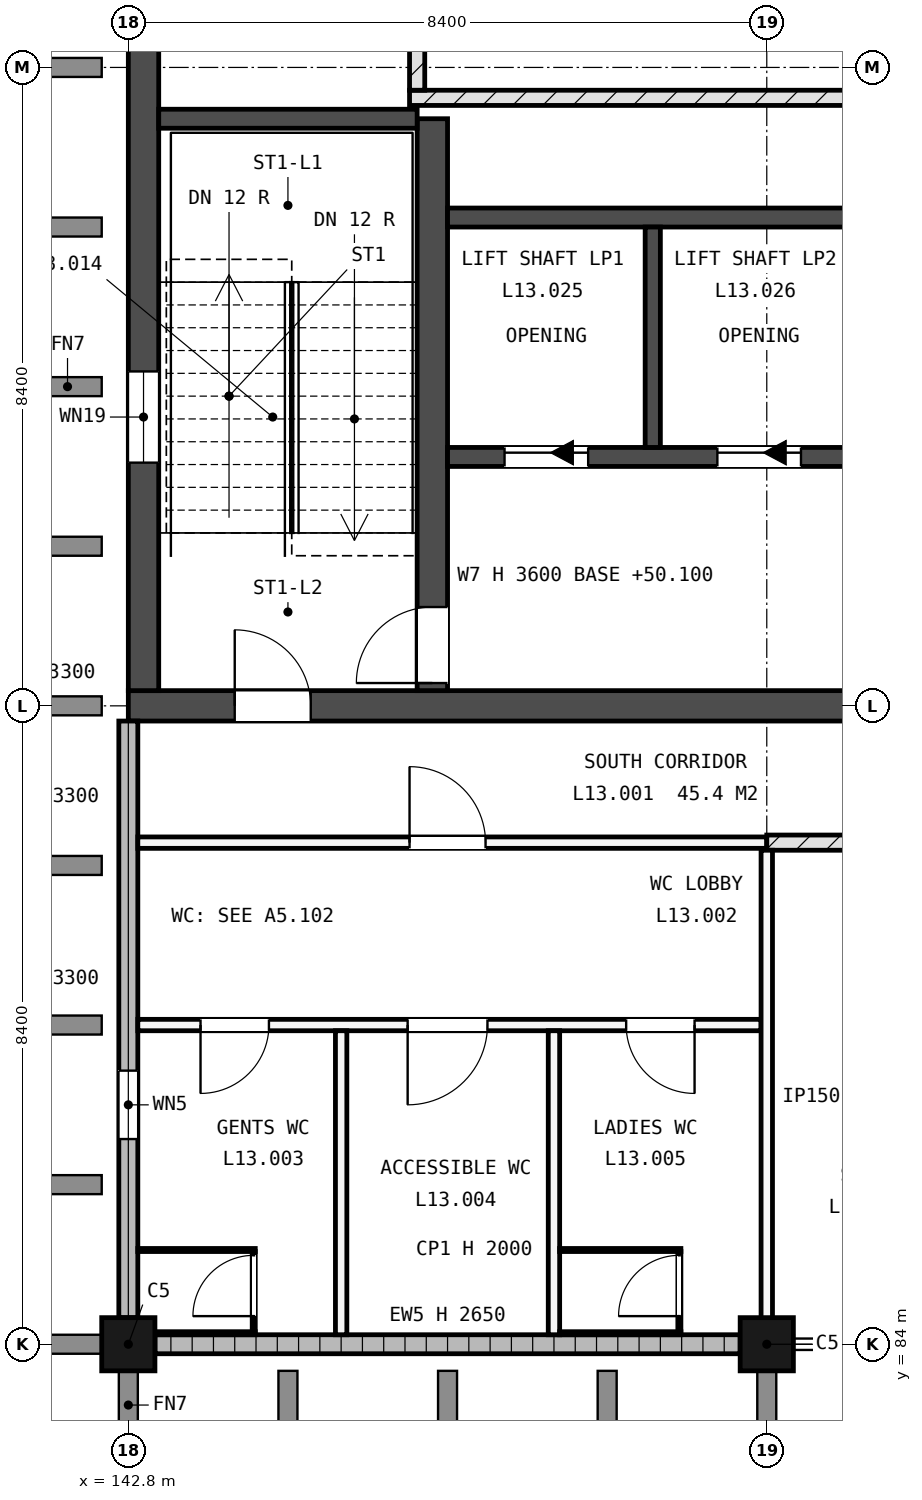
"""IFC4 building model, lengths in metres.
Left out: names, types, materials, properties, quantities, classifications, styles, units other than length and angle.
Written with IfcOpenShell. Run it as: python <this file> out.ifc"""

import sys

from ifc_helpers import new_model, si_unit, direction, frame, frame_2d, origin, origin_2d, place, context, subcontext, project, spatial, rectangle, extrude, element, fill, save


model = new_model("IFC4")
c1 = context("Model", 3, precision=1e-05, world=origin(), true_north=direction((0.0, 1.0)))
c2 = subcontext(c1, "Body", "Model", "MODEL_VIEW")
j1 = project(units=[si_unit("LENGTHUNIT", "METRE"), si_unit("PLANEANGLEUNIT", "RADIAN")], contexts=[c1])
p1 = place(None, origin())
s1 = spatial("IfcSite", under=j1, at=p1, CompositionType="ELEMENT")
p2 = place(p1, origin())
s2 = spatial("IfcBuilding", under=s1, at=p2, CompositionType="ELEMENT")
p3 = place(p2, frame((0.0, 0.0, 50.4)))
s3 = spatial("IfcBuildingStorey", under=s2, at=p3, CompositionType="ELEMENT", Elevation=50.4)
for number, where, z_axis, x_axis in (
    (1, (142.8, 84.0, -0.3), (0.0, 0.0, 1.0), (1.0, 0.0, 0.0)),
    (2, (151.2, 84.0, -0.3), (0.0, 0.0, 1.0), (1.0, 0.0, 0.0)),
):
    element("IfcColumn", number, at=place(p3, frame(where, z_axis=z_axis, x_axis=x_axis)), inside=s3, PredefinedType="COLUMN", context=c2, shape_type="SweptSolid", body=[
        extrude(rectangle(XDim=0.7, YDim=0.7, at=origin_2d()), origin(), (0.0, 0.0, 1.0), 3.6),
    ])
p4 = place(p3, frame((142.8, 92.4, -0.3), z_axis=(0.0, 0.0, 1.0), x_axis=(1.0, 0.0, 0.0)))
e3 = element("IfcWall", 3, at=p4, inside=s3, PredefinedType="SHEAR", context=c2, shape_type="SweptSolid", body=[
    extrude(rectangle(XDim=25.2, YDim=0.4, at=frame_2d((12.6, 0.0))), origin(), (0.0, 0.0, 1.0), 3.6),
])
p5 = place(p4, frame((1.4, 0.0, 0.3)))
e4 = element("IfcOpeningElement", 4, at=p5, cuts=e3, PredefinedType="OPENING", context=c2, shape_type="SweptSolid", body=[
    extrude(rectangle(XDim=1.0, YDim=2.1, at=frame_2d((0.5, 1.05))), frame((0.0, 0.21, 0.0), z_axis=(0.0, -1.0, 0.0), x_axis=(1.0, 0.0, 0.0)), (0.0, 0.0, 1.0), 0.42),
])
p6 = place(p4, frame((19.1, 0.0, 0.3)))
e5 = element("IfcOpeningElement", 5, at=p6, cuts=e3, PredefinedType="OPENING", context=c2, shape_type="SweptSolid", body=[
    extrude(rectangle(XDim=1.0, YDim=2.1, at=frame_2d((0.5, 1.05))), frame((0.0, 0.21, 0.0), z_axis=(0.0, -1.0, 0.0), x_axis=(1.0, 0.0, 0.0)), (0.0, 0.0, 1.0), 0.42),
])
p7 = place(p4, frame((10.4, 0.0, 0.3)))
e6 = element("IfcOpeningElement", 6, at=p7, cuts=e3, PredefinedType="OPENING", context=c2, shape_type="SweptSolid", body=[
    extrude(rectangle(XDim=1.0, YDim=2.1, at=frame_2d((0.5, 1.05))), frame((0.0, 0.21, 0.0), z_axis=(0.0, -1.0, 0.0), x_axis=(1.0, 0.0, 0.0)), (0.0, 0.0, 1.0), 0.42),
])
p8 = place(p3, frame((143.0, 92.6, -0.3), z_axis=(0.0, 0.0, 1.0), x_axis=(0.0, 1.0, 0.0)))
e7 = element("IfcWall", 7, at=p8, inside=s3, PredefinedType="SHEAR", context=c2, shape_type="SweptSolid", body=[
    extrude(rectangle(XDim=16.4, YDim=0.4, at=frame_2d((8.2, 0.0))), origin(), (0.0, 0.0, 1.0), 3.6),
])
p9 = place(p8, frame((3.0, 0.0, 1.9)))
e8 = element("IfcOpeningElement", 8, at=p9, cuts=e7, PredefinedType="OPENING", context=c2, shape_type="SweptSolid", body=[
    extrude(rectangle(XDim=1.2, YDim=0.9, at=frame_2d((0.6, 0.45))), frame((0.0, 0.21, 0.0), z_axis=(0.0, -1.0, 0.0), x_axis=(1.0, 0.0, 0.0)), (0.0, 0.0, 1.0), 0.42),
])
p10 = place(p3, frame((146.8, 92.6, -0.3), z_axis=(0.0, 0.0, 1.0), x_axis=(0.0, 1.0, 0.0)))
e9 = element("IfcWall", 9, at=p10, inside=s3, PredefinedType="SHEAR", context=c2, shape_type="SweptSolid", body=[
    extrude(rectangle(XDim=7.525, YDim=0.4, at=frame_2d((3.762, 0.0))), origin(), (0.0, 0.0, 1.0), 3.6),
])
p11 = place(p10, frame((0.1, 0.0, 0.3)))
e10 = element("IfcOpeningElement", 10, at=p11, cuts=e9, PredefinedType="OPENING", context=c2, shape_type="SweptSolid", body=[
    extrude(rectangle(XDim=1.0, YDim=2.1, at=frame_2d((0.5, 1.05))), frame((0.0, 0.21, 0.0), z_axis=(0.0, -1.0, 0.0), x_axis=(1.0, 0.0, 0.0)), (0.0, 0.0, 1.0), 0.42),
])
p12 = place(p3, frame((143.2, 100.125, -0.3), z_axis=(0.0, 0.0, 1.0), x_axis=(1.0, 0.0, 0.0)))
e11 = element("IfcWall", 11, at=p12, inside=s3, PredefinedType="SHEAR", context=c2, shape_type="SweptSolid", body=[
    extrude(rectangle(XDim=3.4, YDim=0.25, at=frame_2d((1.7, 0.0))), origin(), (0.0, 0.0, 1.0), 3.6),
])
p13 = place(p3, frame((147.0, 95.675, -0.3), z_axis=(0.0, 0.0, 1.0), x_axis=(1.0, 0.0, 0.0)))
e12 = element("IfcWall", 12, at=p13, inside=s3, PredefinedType="SHEAR", context=c2, shape_type="SweptSolid", body=[
    extrude(rectangle(XDim=11.25, YDim=0.25, at=frame_2d((5.625, 0.0))), origin(), (0.0, 0.0, 1.0), 3.6),
])
p14 = place(p13, frame((0.75, 0.0, 0.3)))
e13 = element("IfcOpeningElement", 13, at=p14, cuts=e12, PredefinedType="OPENING", context=c2, shape_type="SweptSolid", body=[
    extrude(rectangle(XDim=1.1, YDim=2.1, at=frame_2d((0.55, 1.05))), frame((0.0, 0.135, 0.0), z_axis=(0.0, -1.0, 0.0), x_axis=(1.0, 0.0, 0.0)), (0.0, 0.0, 1.0), 0.27),
])
p15 = place(p13, frame((3.55, 0.0, 0.3)))
e14 = element("IfcOpeningElement", 14, at=p15, cuts=e12, PredefinedType="OPENING", context=c2, shape_type="SweptSolid", body=[
    extrude(rectangle(XDim=1.1, YDim=2.1, at=frame_2d((0.55, 1.05))), frame((0.0, 0.135, 0.0), z_axis=(0.0, -1.0, 0.0), x_axis=(1.0, 0.0, 0.0)), (0.0, 0.0, 1.0), 0.27),
])
p16 = place(p13, frame((6.35, 0.0, 0.3)))
e15 = element("IfcOpeningElement", 15, at=p16, cuts=e12, PredefinedType="OPENING", context=c2, shape_type="SweptSolid", body=[
    extrude(rectangle(XDim=1.1, YDim=2.1, at=frame_2d((0.55, 1.05))), frame((0.0, 0.135, 0.0), z_axis=(0.0, -1.0, 0.0), x_axis=(1.0, 0.0, 0.0)), (0.0, 0.0, 1.0), 0.27),
])
p17 = place(p13, frame((9.15, 0.0, 0.3)))
e16 = element("IfcOpeningElement", 16, at=p17, cuts=e12, PredefinedType="OPENING", context=c2, shape_type="SweptSolid", body=[
    extrude(rectangle(XDim=1.1, YDim=2.1, at=frame_2d((0.55, 1.05))), frame((0.0, 0.135, 0.0), z_axis=(0.0, -1.0, 0.0), x_axis=(1.0, 0.0, 0.0)), (0.0, 0.0, 1.0), 0.27),
])
p18 = place(p3, frame((147.0, 98.825, -0.3), z_axis=(0.0, 0.0, 1.0), x_axis=(1.0, 0.0, 0.0)))
e17 = element("IfcWall", 17, at=p18, inside=s3, PredefinedType="SHEAR", context=c2, shape_type="SweptSolid", body=[
    extrude(rectangle(XDim=11.25, YDim=0.25, at=frame_2d((5.625, 0.0))), origin(), (0.0, 0.0, 1.0), 3.6),
])
p19 = place(p3, frame((149.7, 95.8, -0.3), z_axis=(0.0, 0.0, 1.0), x_axis=(0.0, 1.0, 0.0)))
e18 = element("IfcWall", 18, at=p19, inside=s3, PredefinedType="SHEAR", context=c2, shape_type="SweptSolid", body=[
    extrude(rectangle(XDim=2.9, YDim=0.2, at=frame_2d((1.45, 0.0))), origin(), (0.0, 0.0, 1.0), 3.6),
])
p20 = place(p3, frame((143.15, 84.0, 0.0), z_axis=(0.0, 0.0, 1.0), x_axis=(1.0, 0.0, 0.0)))
e19 = element("IfcWall", 19, at=p20, inside=s3, PredefinedType="STANDARD", context=c2, shape_type="SweptSolid", body=[
    extrude(rectangle(XDim=7.7, YDim=0.25, at=frame_2d((3.85, 0.0))), origin(), (0.0, 0.0, 1.0), 2.65),
])
p21 = place(p3, frame((142.8, 84.35, 0.0), z_axis=(0.0, 0.0, 1.0), x_axis=(0.0, 1.0, 0.0)))
e20 = element("IfcWall", 20, at=p21, inside=s3, PredefinedType="STANDARD", context=c2, shape_type="SweptSolid", body=[
    extrude(rectangle(XDim=7.85, YDim=0.25, at=frame_2d((3.925, 0.0))), origin(), (0.0, 0.0, 1.0), 3.3),
])
p22 = place(p21, frame((2.35, 0.0, 2.1)))
e21 = element("IfcOpeningElement", 21, at=p22, cuts=e20, PredefinedType="OPENING", context=c2, shape_type="SweptSolid", body=[
    extrude(rectangle(XDim=0.9, YDim=0.6, at=frame_2d((0.45, 0.3))), frame((0.0, 0.135, 0.0), z_axis=(0.0, -1.0, 0.0), x_axis=(1.0, 0.0, 0.0)), (0.0, 0.0, 1.0), 0.27),
])
p23 = place(p3, frame((142.925, 88.2, 0.0), z_axis=(0.0, 0.0, 1.0), x_axis=(1.0, 0.0, 0.0)))
e22 = element("IfcWall", 22, at=p23, inside=s3, PredefinedType="PARTITIONING", context=c2, shape_type="SweptSolid", body=[
    extrude(rectangle(XDim=8.2, YDim=0.15, at=frame_2d((4.1, 0.0))), origin(), (0.0, 0.0, 1.0), 3.3),
])
p24 = place(p23, frame((0.825, 0.0, 0.0)))
e23 = element("IfcOpeningElement", 23, at=p24, cuts=e22, PredefinedType="OPENING", context=c2, shape_type="SweptSolid", body=[
    extrude(rectangle(XDim=0.9, YDim=2.1, at=frame_2d((0.45, 1.05))), frame((0.0, 0.085, 0.0), z_axis=(0.0, -1.0, 0.0), x_axis=(1.0, 0.0, 0.0)), (0.0, 0.0, 1.0), 0.17),
])
p25 = place(p23, frame((3.55, 0.0, 0.0)))
e24 = element("IfcOpeningElement", 24, at=p25, cuts=e22, PredefinedType="OPENING", context=c2, shape_type="SweptSolid", body=[
    extrude(rectangle(XDim=1.05, YDim=2.25, at=frame_2d((0.525, 1.125))), frame((0.0, 0.085, 0.0), z_axis=(0.0, -1.0, 0.0), x_axis=(1.0, 0.0, 0.0)), (0.0, 0.0, 1.0), 0.17),
])
p26 = place(p23, frame((6.425, 0.0, 0.0)))
e25 = element("IfcOpeningElement", 25, at=p26, cuts=e22, PredefinedType="OPENING", context=c2, shape_type="SweptSolid", body=[
    extrude(rectangle(XDim=0.9, YDim=2.1, at=frame_2d((0.45, 1.05))), frame((0.0, 0.085, 0.0), z_axis=(0.0, -1.0, 0.0), x_axis=(1.0, 0.0, 0.0)), (0.0, 0.0, 1.0), 0.17),
])
p27 = place(p3, frame((142.925, 90.6, 0.0), z_axis=(0.0, 0.0, 1.0), x_axis=(1.0, 0.0, 0.0)))
e26 = element("IfcWall", 26, at=p27, inside=s3, PredefinedType="PARTITIONING", context=c2, shape_type="SweptSolid", body=[
    extrude(rectangle(XDim=8.275, YDim=0.15, at=frame_2d((4.137, 0.0))), origin(), (0.0, 0.0, 1.0), 3.3),
])
p28 = place(p27, frame((3.575, 0.0, 0.0)))
e27 = element("IfcOpeningElement", 27, at=p28, cuts=e26, PredefinedType="OPENING", context=c2, shape_type="SweptSolid", body=[
    extrude(rectangle(XDim=1.0, YDim=2.1, at=frame_2d((0.5, 1.05))), frame((0.0, 0.085, 0.0), z_axis=(0.0, -1.0, 0.0), x_axis=(1.0, 0.0, 0.0)), (0.0, 0.0, 1.0), 0.17),
])
p29 = place(p3, frame((151.2, 90.6, 0.0), z_axis=(0.0, 0.0, 1.0), x_axis=(1.0, 0.0, 0.0)))
e28 = element("IfcWall", 28, at=p29, inside=s3, PredefinedType="SOLIDWALL", context=c2, shape_type="SweptSolid", body=[
    extrude(rectangle(XDim=16.8, YDim=0.2, at=frame_2d((8.4, 0.0))), origin(), (0.0, 0.0, 1.0), 3.3),
])
p30 = place(p29, frame((1.575, 0.0, 0.0)))
e29 = element("IfcOpeningElement", 29, at=p30, cuts=e28, PredefinedType="OPENING", context=c2, shape_type="SweptSolid", body=[
    extrude(rectangle(XDim=1.05, YDim=2.1, at=frame_2d((0.525, 1.05))), frame((0.0, 0.11, 0.0), z_axis=(0.0, -1.0, 0.0), x_axis=(1.0, 0.0, 0.0)), (0.0, 0.0, 1.0), 0.22),
])
p31 = place(p29, frame((5.775, 0.0, 0.0)))
e30 = element("IfcOpeningElement", 30, at=p31, cuts=e28, PredefinedType="OPENING", context=c2, shape_type="SweptSolid", body=[
    extrude(rectangle(XDim=1.05, YDim=2.1, at=frame_2d((0.525, 1.05))), frame((0.0, 0.11, 0.0), z_axis=(0.0, -1.0, 0.0), x_axis=(1.0, 0.0, 0.0)), (0.0, 0.0, 1.0), 0.22),
])
p32 = place(p29, frame((10.0, 0.0, 0.0)))
e31 = element("IfcOpeningElement", 31, at=p32, cuts=e28, PredefinedType="OPENING", context=c2, shape_type="SweptSolid", body=[
    extrude(rectangle(XDim=1.0, YDim=2.1, at=frame_2d((0.5, 1.05))), frame((0.0, 0.11, 0.0), z_axis=(0.0, -1.0, 0.0), x_axis=(1.0, 0.0, 0.0)), (0.0, 0.0, 1.0), 0.22),
])
p33 = place(p29, frame((14.2, 0.0, 0.0)))
e32 = element("IfcOpeningElement", 32, at=p33, cuts=e28, PredefinedType="OPENING", context=c2, shape_type="SweptSolid", body=[
    extrude(rectangle(XDim=1.0, YDim=2.1, at=frame_2d((0.5, 1.05))), frame((0.0, 0.11, 0.0), z_axis=(0.0, -1.0, 0.0), x_axis=(1.0, 0.0, 0.0)), (0.0, 0.0, 1.0), 0.22),
])
p34 = place(p3, frame((146.5, 100.4, 0.0), z_axis=(0.0, 0.0, 1.0), x_axis=(1.0, 0.0, 0.0)))
e33 = element("IfcWall", 33, at=p34, inside=s3, PredefinedType="SOLIDWALL", context=c2, shape_type="SweptSolid", body=[
    extrude(rectangle(XDim=14.0, YDim=0.2, at=frame_2d((7.0, 0.0))), origin(), (0.0, 0.0, 1.0), 3.3),
])
p35 = place(p3, frame((145.6, 84.125, 0.0), z_axis=(0.0, 0.0, 1.0), x_axis=(0.0, 1.0, 0.0)))
e34 = element("IfcWall", 34, at=p35, inside=s3, PredefinedType="PARTITIONING", context=c2, shape_type="SweptSolid", body=[
    extrude(rectangle(XDim=4.0, YDim=0.15, at=frame_2d((2.0, 0.0))), origin(), (0.0, 0.0, 1.0), 3.3),
])
p36 = place(p3, frame((146.6, 100.5, 0.0), z_axis=(0.0, 0.0, 1.0), x_axis=(0.0, 1.0, 0.0)))
e35 = element("IfcWall", 35, at=p36, inside=s3, PredefinedType="SOLIDWALL", context=c2, shape_type="SweptSolid", body=[
    extrude(rectangle(XDim=5.3, YDim=0.2, at=frame_2d((2.65, 0.0))), origin(), (0.0, 0.0, 1.0), 3.3),
])
p37 = place(p36, frame((1.8, 0.0, 0.0)))
e36 = element("IfcOpeningElement", 36, at=p37, cuts=e35, PredefinedType="OPENING", context=c2, shape_type="SweptSolid", body=[
    extrude(rectangle(XDim=1.0, YDim=2.1, at=frame_2d((0.5, 1.05))), frame((0.0, 0.11, 0.0), z_axis=(0.0, -1.0, 0.0), x_axis=(1.0, 0.0, 0.0)), (0.0, 0.0, 1.0), 0.22),
])
p38 = place(p3, frame((148.4, 84.125, 0.0), z_axis=(0.0, 0.0, 1.0), x_axis=(0.0, 1.0, 0.0)))
e37 = element("IfcWall", 37, at=p38, inside=s3, PredefinedType="PARTITIONING", context=c2, shape_type="SweptSolid", body=[
    extrude(rectangle(XDim=4.0, YDim=0.15, at=frame_2d((2.0, 0.0))), origin(), (0.0, 0.0, 1.0), 3.3),
])
p39 = place(p3, frame((151.2, 84.0, 0.0), z_axis=(0.0, 0.0, 1.0), x_axis=(0.0, 1.0, 0.0)))
e38 = element("IfcWall", 38, at=p39, inside=s3, PredefinedType="PARTITIONING", context=c2, shape_type="SweptSolid", body=[
    extrude(rectangle(XDim=6.5, YDim=0.15, at=frame_2d((3.25, 0.0))), origin(), (0.0, 0.0, 1.0), 2.6),
])
p40 = place(p3, frame((142.93, 84.145, 0.0), z_axis=(0.0, 0.0, 1.0), x_axis=(1.0, 0.0, 0.0)))
e39 = element("IfcWall", 39, at=p40, inside=s3, PredefinedType="PARTITIONING", context=c2, shape_type="SweptSolid", body=[
    extrude(rectangle(XDim=1.54, YDim=0.04, at=frame_2d((0.77, 0.0))), origin(), (0.0, 0.0, 1.0), 2.0),
])
p41 = place(p3, frame((142.925, 85.24, 0.0), z_axis=(0.0, 0.0, 1.0), x_axis=(1.0, 0.0, 0.0)))
e40 = element("IfcWall", 40, at=p41, inside=s3, PredefinedType="PARTITIONING", context=c2, shape_type="SweptSolid", body=[
    extrude(rectangle(XDim=1.545, YDim=0.04, at=frame_2d((0.772, 0.0))), origin(), (0.0, 0.0, 1.0), 2.0),
])
p42 = place(p3, frame((144.45, 84.165, 0.0), z_axis=(0.0, 0.0, 1.0), x_axis=(0.0, 1.0, 0.0)))
e41 = element("IfcWall", 41, at=p42, inside=s3, PredefinedType="PARTITIONING", context=c2, shape_type="SweptSolid", body=[
    extrude(rectangle(XDim=1.055, YDim=0.04, at=frame_2d((0.527, 0.0))), origin(), (0.0, 0.0, 1.0), 2.0),
])
p43 = place(p42, frame((0.205, 0.0, 0.0)))
e42 = element("IfcOpeningElement", 42, at=p43, cuts=e41, PredefinedType="OPENING", context=c2, shape_type="SweptSolid", body=[
    extrude(rectangle(XDim=0.8, YDim=2.0, at=frame_2d((0.4, 1.0))), frame((0.0, 0.03, 0.0), z_axis=(0.0, -1.0, 0.0), x_axis=(1.0, 0.0, 0.0)), (0.0, 0.0, 1.0), 0.06),
])
for number, where, z_axis, x_axis in (
    (43, (148.475, 84.145, 0.0), (0.0, 0.0, 1.0), (1.0, 0.0, 0.0)),
    (44, (148.475, 85.24, 0.0), (0.0, 0.0, 1.0), (1.0, 0.0, 0.0)),
):
    element("IfcWall", number, at=place(p3, frame(where, z_axis=z_axis, x_axis=x_axis)), inside=s3, PredefinedType="PARTITIONING", context=c2, shape_type="SweptSolid", body=[
        extrude(rectangle(XDim=1.595, YDim=0.04, at=frame_2d((0.797, 0.0))), origin(), (0.0, 0.0, 1.0), 2.0),
    ])
p44 = place(p3, frame((150.05, 84.165, 0.0), z_axis=(0.0, 0.0, 1.0), x_axis=(0.0, 1.0, 0.0)))
e45 = element("IfcWall", 45, at=p44, inside=s3, PredefinedType="PARTITIONING", context=c2, shape_type="SweptSolid", body=[
    extrude(rectangle(XDim=1.055, YDim=0.04, at=frame_2d((0.527, 0.0))), origin(), (0.0, 0.0, 1.0), 2.0),
])
p45 = place(p44, frame((0.205, 0.0, 0.0)))
e46 = element("IfcOpeningElement", 46, at=p45, cuts=e45, PredefinedType="OPENING", context=c2, shape_type="SweptSolid", body=[
    extrude(rectangle(XDim=0.8, YDim=2.0, at=frame_2d((0.4, 1.0))), frame((0.0, 0.03, 0.0), z_axis=(0.0, -1.0, 0.0), x_axis=(1.0, 0.0, 0.0)), (0.0, 0.0, 1.0), 0.06),
])
p46 = place(p22, origin())
e47 = element("IfcWindow", 47, at=p46, inside=s3, PartitioningType="SINGLE_PANEL", PredefinedType="WINDOW", context=c2, shape_type="SweptSolid", body=[
    extrude(rectangle(XDim=0.9, YDim=0.6, at=frame_2d((0.45, 0.3))), frame((0.0, 0.03, 0.0), z_axis=(0.0, -1.0, 0.0), x_axis=(1.0, 0.0, 0.0)), (0.0, 0.0, 1.0), 0.06),
])
fill(e21, e47)
p47 = place(p9, origin())
e48 = element("IfcWindow", 48, at=p47, inside=s3, PartitioningType="SINGLE_PANEL", PredefinedType="WINDOW", context=c2, shape_type="SweptSolid", body=[
    extrude(rectangle(XDim=1.2, YDim=0.9, at=frame_2d((0.6, 0.45))), frame((0.0, 0.03, 0.0), z_axis=(0.0, -1.0, 0.0), x_axis=(1.0, 0.0, 0.0)), (0.0, 0.0, 1.0), 0.06),
])
fill(e8, e48)
p48 = place(p14, origin())
e49 = element("IfcDoor", 49, at=p48, inside=s3, OperationType="SLIDING_TO_LEFT", PredefinedType="DOOR", context=c2, shape_type="SweptSolid", body=[
    extrude(rectangle(XDim=1.1, YDim=2.1, at=frame_2d((0.55, 1.05))), frame((0.0, 0.025, 0.0), z_axis=(0.0, -1.0, 0.0), x_axis=(1.0, 0.0, 0.0)), (0.0, 0.0, 1.0), 0.05),
])
fill(e13, e49)
p49 = place(p15, origin())
e50 = element("IfcDoor", 50, at=p49, inside=s3, OperationType="SLIDING_TO_LEFT", PredefinedType="DOOR", context=c2, shape_type="SweptSolid", body=[
    extrude(rectangle(XDim=1.1, YDim=2.1, at=frame_2d((0.55, 1.05))), frame((0.0, 0.025, 0.0), z_axis=(0.0, -1.0, 0.0), x_axis=(1.0, 0.0, 0.0)), (0.0, 0.0, 1.0), 0.05),
])
fill(e14, e50)
p50 = place(p5, origin())
e51 = element("IfcDoor", 51, at=p50, inside=s3, OperationType="SINGLE_SWING_RIGHT", PredefinedType="DOOR", context=c2, shape_type="SweptSolid", body=[
    extrude(rectangle(XDim=1.0, YDim=2.1, at=frame_2d((0.5, 1.05))), frame((0.0, 0.025, 0.0), z_axis=(0.0, -1.0, 0.0), x_axis=(1.0, 0.0, 0.0)), (0.0, 0.0, 1.0), 0.05),
])
fill(e4, e51)
p51 = place(p11, origin())
e52 = element("IfcDoor", 52, at=p51, inside=s3, OperationType="SINGLE_SWING_RIGHT", PredefinedType="DOOR", context=c2, shape_type="SweptSolid", body=[
    extrude(rectangle(XDim=1.0, YDim=2.1, at=frame_2d((0.5, 1.05))), frame((0.0, 0.025, 0.0), z_axis=(0.0, -1.0, 0.0), x_axis=(1.0, 0.0, 0.0)), (0.0, 0.0, 1.0), 0.05),
])
fill(e10, e52)
p52 = place(p24, origin())
e53 = element("IfcDoor", 53, at=p52, inside=s3, OperationType="SINGLE_SWING_LEFT", PredefinedType="DOOR", context=c2, shape_type="SweptSolid", body=[
    extrude(rectangle(XDim=0.9, YDim=2.1, at=frame_2d((0.45, 1.05))), frame((0.0, 0.025, 0.0), z_axis=(0.0, -1.0, 0.0), x_axis=(1.0, 0.0, 0.0)), (0.0, 0.0, 1.0), 0.05),
])
fill(e23, e53)
p53 = place(p25, origin())
e54 = element("IfcDoor", 54, at=p53, inside=s3, OperationType="SINGLE_SWING_LEFT", PredefinedType="DOOR", context=c2, shape_type="SweptSolid", body=[
    extrude(rectangle(XDim=1.05, YDim=2.25, at=frame_2d((0.525, 1.125))), frame((0.0, 0.025, 0.0), z_axis=(0.0, -1.0, 0.0), x_axis=(1.0, 0.0, 0.0)), (0.0, 0.0, 1.0), 0.05),
])
fill(e24, e54)
p54 = place(p26, origin())
e55 = element("IfcDoor", 55, at=p54, inside=s3, OperationType="SINGLE_SWING_RIGHT", PredefinedType="DOOR", context=c2, shape_type="SweptSolid", body=[
    extrude(rectangle(XDim=0.9, YDim=2.1, at=frame_2d((0.45, 1.05))), frame((0.0, 0.025, 0.0), z_axis=(0.0, -1.0, 0.0), x_axis=(1.0, 0.0, 0.0)), (0.0, 0.0, 1.0), 0.05),
])
fill(e25, e55)
p55 = place(p28, origin())
e56 = element("IfcDoor", 56, at=p55, inside=s3, OperationType="SINGLE_SWING_RIGHT", PredefinedType="DOOR", context=c2, shape_type="SweptSolid", body=[
    extrude(rectangle(XDim=1.0, YDim=2.1, at=frame_2d((0.5, 1.05))), frame((0.0, 0.025, 0.0), z_axis=(0.0, -1.0, 0.0), x_axis=(1.0, 0.0, 0.0)), (0.0, 0.0, 1.0), 0.05),
])
fill(e27, e56)
p56 = place(p43, origin())
e57 = element("IfcDoor", 57, at=p56, inside=s3, OperationType="SINGLE_SWING_LEFT", PredefinedType="DOOR", context=c2, shape_type="SweptSolid", body=[
    extrude(rectangle(XDim=0.8, YDim=2.0, at=frame_2d((0.4, 1.0))), frame((0.0, 0.02, 0.0), z_axis=(0.0, -1.0, 0.0), x_axis=(1.0, 0.0, 0.0)), (0.0, 0.0, 1.0), 0.04),
])
fill(e42, e57)
p57 = place(p45, origin())
e58 = element("IfcDoor", 58, at=p57, inside=s3, OperationType="SINGLE_SWING_LEFT", PredefinedType="DOOR", context=c2, shape_type="SweptSolid", body=[
    extrude(rectangle(XDim=0.8, YDim=2.0, at=frame_2d((0.4, 1.0))), frame((0.0, 0.02, 0.0), z_axis=(0.0, -1.0, 0.0), x_axis=(1.0, 0.0, 0.0)), (0.0, 0.0, 1.0), 0.04),
])
fill(e46, e58)
save(model, sys.argv[1])
